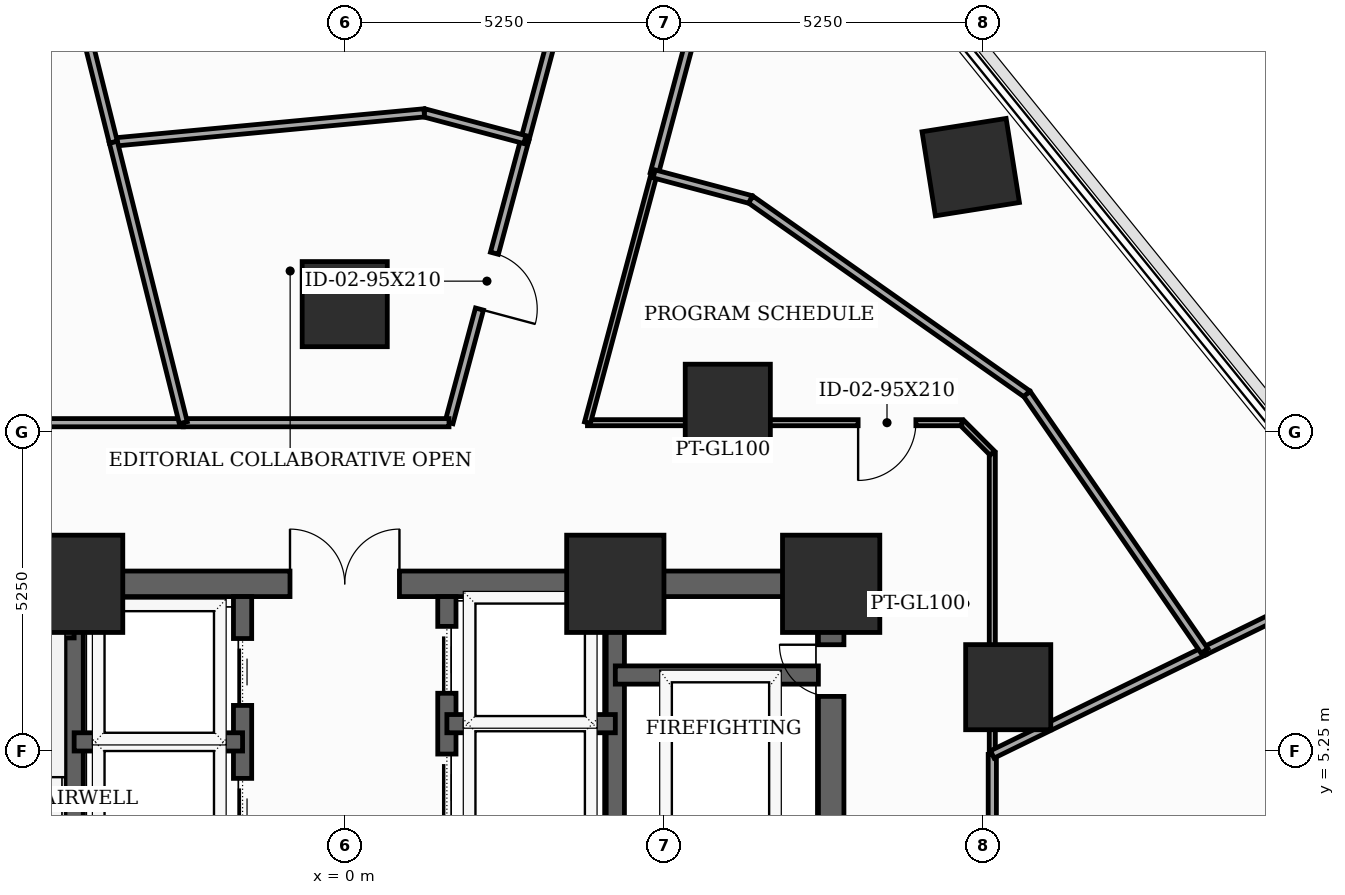
"""IFC4 building model, lengths in metres.
Left out: names, types, materials, properties, quantities, classifications, styles, units other than length and angle.
Written with IfcOpenShell. Run it as: python <this file> out.ifc"""

import sys

from ifc_helpers import new_model, si_unit, direction, frame, frame_2d, origin, origin_2d, place, context, subcontext, project, spatial, rectangle, extrude, element, fill, save


model = new_model("IFC4")
c1 = context("Model", 3, precision=1e-05, world=origin(), true_north=direction((0.0, 1.0)))
c2 = subcontext(c1, "Body", "Model", "MODEL_VIEW")
j1 = project(units=[si_unit("LENGTHUNIT", "METRE"), si_unit("PLANEANGLEUNIT", "RADIAN")], contexts=[c1])
p1 = place(None, origin())
s1 = spatial("IfcSite", under=j1, at=p1, CompositionType="ELEMENT")
p2 = place(p1, origin())
s2 = spatial("IfcBuilding", under=s1, at=p2, CompositionType="ELEMENT")
p3 = place(p2, frame((0.0, 0.0, 66.7)))
s3 = spatial("IfcBuildingStorey", under=s2, at=p3, CompositionType="ELEMENT", Elevation=66.7)
for number, where, z_axis, x_axis in (
    (1, (8.0, 8.0, 0.0), (0.0, 0.0, 1.0), (1.0, 0.0, 0.0)),
    (2, (4.45, 8.0, 0.0), (0.0, 0.0, 1.0), (1.0, 0.0, 0.0)),
    (3, (-4.45, 8.0, 0.0), (0.0, 0.0, 1.0), (1.0, 0.0, 0.0)),
):
    element("IfcColumn", number, at=place(p3, frame(where, z_axis=z_axis, x_axis=x_axis)), inside=s3, PredefinedType="COLUMN", context=c2, shape_type="SweptSolid", body=[
        extrude(rectangle(XDim=1.6, YDim=1.6, at=origin_2d()), origin(), (0.0, 0.0, 1.0), 3.7),
    ])
for number, where, z_axis, x_axis in (
    (4, (10.912, 6.3, 0.0), (0.0, 0.0, 1.0), (1.0, 0.0, 0.0)),
    (5, (6.3, 10.912, 0.0), (0.0, 0.0, 1.0), (1.0, 0.0, 0.0)),
    (6, (0.0, 12.6, 0.0), (0.0, 0.0, 1.0), (1.0, 0.0, 0.0)),
    (7, (10.295, 14.853, 0.0), (0.0, 0.0, 1.0), (0.988, 0.156, 0.0)),
):
    element("IfcColumn", number, at=place(p3, frame(where, z_axis=z_axis, x_axis=x_axis)), inside=s3, PredefinedType="COLUMN", context=c2, shape_type="SweptSolid", body=[
        extrude(rectangle(XDim=1.4, YDim=1.4, at=origin_2d()), origin(), (0.0, 0.0, 1.0), 3.7),
    ])
p4 = place(p3, frame((8.0, -8.0, 0.0), z_axis=(0.0, 0.0, 1.0), x_axis=(0.0, 1.0, 0.0)))
e8 = element("IfcWall", 8, at=p4, inside=s3, PredefinedType="SHEAR", context=c2, shape_type="SweptSolid", body=[
    extrude(rectangle(XDim=16.0, YDim=0.42, at=frame_2d((8.0, 0.0))), origin(), (0.0, 0.0, 1.0), 3.5),
])
p5 = place(p4, frame((9.6, 0.0, 0.0)))
e9 = element("IfcOpeningElement", 9, at=p5, cuts=e8, PredefinedType="OPENING", context=c2, shape_type="SweptSolid", body=[
    extrude(rectangle(XDim=1.05, YDim=2.15, at=frame_2d((0.525, 1.075))), frame((0.0, 0.22, 0.0), z_axis=(0.0, -1.0, 0.0), x_axis=(1.0, 0.0, 0.0)), (0.0, 0.0, 1.0), 0.44),
])
p6 = place(p4, frame((14.148, 0.0, 0.0)))
e10 = element("IfcOpeningElement", 10, at=p6, cuts=e8, PredefinedType="OPENING", context=c2, shape_type="SweptSolid", body=[
    extrude(rectangle(XDim=0.85, YDim=2.02, at=frame_2d((0.425, 1.01))), frame((0.0, 0.22, 0.0), z_axis=(0.0, -1.0, 0.0), x_axis=(1.0, 0.0, 0.0)), (0.0, 0.0, 1.0), 0.44),
])
p7 = place(p3, frame((-8.0, 8.0, 0.0), z_axis=(0.0, 0.0, 1.0), x_axis=(1.0, 0.0, 0.0)))
e11 = element("IfcWall", 11, at=p7, inside=s3, PredefinedType="SHEAR", context=c2, shape_type="SweptSolid", body=[
    extrude(rectangle(XDim=16.0, YDim=0.42, at=frame_2d((8.0, 0.0))), origin(), (0.0, 0.0, 1.0), 3.5),
])
p8 = place(p7, frame((7.1, 0.0, 0.0)))
e12 = element("IfcOpeningElement", 12, at=p8, cuts=e11, PredefinedType="OPENING", context=c2, shape_type="SweptSolid", body=[
    extrude(rectangle(XDim=1.8, YDim=2.15, at=frame_2d((0.9, 1.075))), frame((0.0, 0.22, 0.0), z_axis=(0.0, -1.0, 0.0), x_axis=(1.0, 0.0, 0.0)), (0.0, 0.0, 1.0), 0.44),
])
for number, where, z_axis, x_axis in (
    (13, (-4.45, -7.79, 0.0), (0.0, 0.0, 1.0), (0.0, 1.0, 0.0)),
    (14, (4.45, -7.79, 0.0), (0.0, 0.0, 1.0), (0.0, 1.0, 0.0)),
):
    element("IfcWall", number, at=place(p3, frame(where, z_axis=z_axis, x_axis=x_axis)), inside=s3, PredefinedType="SHEAR", context=c2, shape_type="SweptSolid", body=[
        extrude(rectangle(XDim=15.58, YDim=0.3, at=frame_2d((7.79, 0.0))), origin(), (0.0, 0.0, 1.0), 3.5),
    ])
for number, where, z_axis, x_axis in (
    (15, (-7.79, 7.26, 0.0), (0.0, 0.0, 1.0), (1.0, 0.0, 0.0)),
    (16, (4.45, 6.5, 0.0), (0.0, 0.0, 1.0), (1.0, 0.0, 0.0)),
):
    element("IfcWall", number, at=place(p3, frame(where, z_axis=z_axis, x_axis=x_axis)), inside=s3, PredefinedType="SHEAR", context=c2, shape_type="SweptSolid", body=[
        extrude(rectangle(XDim=3.34, YDim=0.3, at=frame_2d((1.67, 0.0))), origin(), (0.0, 0.0, 1.0), 3.5),
    ])
p9 = place(p3, frame((-1.68, -4.85, 0.0), z_axis=(0.0, 0.0, 1.0), x_axis=(0.0, 1.0, 0.0)))
e17 = element("IfcWall", 17, at=p9, inside=s3, PredefinedType="SHEAR", context=c2, shape_type="SweptSolid", body=[
    extrude(rectangle(XDim=12.64, YDim=0.3, at=frame_2d((6.32, 0.0))), origin(), (0.0, 0.0, 1.0), 3.5),
])
p10 = place(p9, frame((3.95, 0.0, 0.0)))
e18 = element("IfcOpeningElement", 18, at=p10, cuts=e17, PredefinedType="OPENING", context=c2, shape_type="SweptSolid", body=[
    extrude(rectangle(XDim=1.1, YDim=2.1, at=frame_2d((0.55, 1.05))), frame((0.0, 0.16, 0.0), z_axis=(0.0, -1.0, 0.0), x_axis=(1.0, 0.0, 0.0)), (0.0, 0.0, 1.0), 0.32),
])
p11 = place(p9, frame((6.25, 0.0, 0.0)))
e19 = element("IfcOpeningElement", 19, at=p11, cuts=e17, PredefinedType="OPENING", context=c2, shape_type="SweptSolid", body=[
    extrude(rectangle(XDim=1.1, YDim=2.1, at=frame_2d((0.55, 1.05))), frame((0.0, 0.16, 0.0), z_axis=(0.0, -1.0, 0.0), x_axis=(1.0, 0.0, 0.0)), (0.0, 0.0, 1.0), 0.32),
])
p12 = place(p9, frame((8.55, 0.0, 0.0)))
e20 = element("IfcOpeningElement", 20, at=p12, cuts=e17, PredefinedType="OPENING", context=c2, shape_type="SweptSolid", body=[
    extrude(rectangle(XDim=1.1, YDim=2.1, at=frame_2d((0.55, 1.05))), frame((0.0, 0.16, 0.0), z_axis=(0.0, -1.0, 0.0), x_axis=(1.0, 0.0, 0.0)), (0.0, 0.0, 1.0), 0.32),
])
p13 = place(p9, frame((10.85, 0.0, 0.0)))
e21 = element("IfcOpeningElement", 21, at=p13, cuts=e17, PredefinedType="OPENING", context=c2, shape_type="SweptSolid", body=[
    extrude(rectangle(XDim=1.1, YDim=2.1, at=frame_2d((0.55, 1.05))), frame((0.0, 0.16, 0.0), z_axis=(0.0, -1.0, 0.0), x_axis=(1.0, 0.0, 0.0)), (0.0, 0.0, 1.0), 0.32),
])
p14 = place(p9, frame((0.45, 0.0, 0.0)))
e22 = element("IfcOpeningElement", 22, at=p14, cuts=e17, PredefinedType="OPENING", context=c2, shape_type="SweptSolid", body=[
    extrude(rectangle(XDim=0.85, YDim=2.02, at=frame_2d((0.425, 1.01))), frame((0.0, 0.16, 0.0), z_axis=(0.0, -1.0, 0.0), x_axis=(1.0, 0.0, 0.0)), (0.0, 0.0, 1.0), 0.32),
])
p15 = place(p9, frame((2.05, 0.0, 0.0)))
e23 = element("IfcOpeningElement", 23, at=p15, cuts=e17, PredefinedType="OPENING", context=c2, shape_type="SweptSolid", body=[
    extrude(rectangle(XDim=0.85, YDim=2.02, at=frame_2d((0.425, 1.01))), frame((0.0, 0.16, 0.0), z_axis=(0.0, -1.0, 0.0), x_axis=(1.0, 0.0, 0.0)), (0.0, 0.0, 1.0), 0.32),
])
p16 = place(p3, frame((1.68, -4.85, 0.0), z_axis=(0.0, 0.0, 1.0), x_axis=(0.0, 1.0, 0.0)))
e24 = element("IfcWall", 24, at=p16, inside=s3, PredefinedType="SHEAR", context=c2, shape_type="SweptSolid", body=[
    extrude(rectangle(XDim=12.64, YDim=0.3, at=frame_2d((6.32, 0.0))), origin(), (0.0, 0.0, 1.0), 3.5),
])
p17 = place(p16, frame((0.55, 0.0, 0.0)))
e25 = element("IfcOpeningElement", 25, at=p17, cuts=e24, PredefinedType="OPENING", context=c2, shape_type="SweptSolid", body=[
    extrude(rectangle(XDim=1.1, YDim=2.1, at=frame_2d((0.55, 1.05))), frame((0.0, 0.16, 0.0), z_axis=(0.0, -1.0, 0.0), x_axis=(1.0, 0.0, 0.0)), (0.0, 0.0, 1.0), 0.32),
])
p18 = place(p16, frame((2.65, 0.0, 0.0)))
e26 = element("IfcOpeningElement", 26, at=p18, cuts=e24, PredefinedType="OPENING", context=c2, shape_type="SweptSolid", body=[
    extrude(rectangle(XDim=1.1, YDim=2.1, at=frame_2d((0.55, 1.05))), frame((0.0, 0.16, 0.0), z_axis=(0.0, -1.0, 0.0), x_axis=(1.0, 0.0, 0.0)), (0.0, 0.0, 1.0), 0.32),
])
p19 = place(p16, frame((4.75, 0.0, 0.0)))
e27 = element("IfcOpeningElement", 27, at=p19, cuts=e24, PredefinedType="OPENING", context=c2, shape_type="SweptSolid", body=[
    extrude(rectangle(XDim=1.1, YDim=2.1, at=frame_2d((0.55, 1.05))), frame((0.0, 0.16, 0.0), z_axis=(0.0, -1.0, 0.0), x_axis=(1.0, 0.0, 0.0)), (0.0, 0.0, 1.0), 0.32),
])
p20 = place(p16, frame((6.85, 0.0, 0.0)))
e28 = element("IfcOpeningElement", 28, at=p20, cuts=e24, PredefinedType="OPENING", context=c2, shape_type="SweptSolid", body=[
    extrude(rectangle(XDim=1.1, YDim=2.1, at=frame_2d((0.55, 1.05))), frame((0.0, 0.16, 0.0), z_axis=(0.0, -1.0, 0.0), x_axis=(1.0, 0.0, 0.0)), (0.0, 0.0, 1.0), 0.32),
])
p21 = place(p16, frame((8.95, 0.0, 0.0)))
e29 = element("IfcOpeningElement", 29, at=p21, cuts=e24, PredefinedType="OPENING", context=c2, shape_type="SweptSolid", body=[
    extrude(rectangle(XDim=1.1, YDim=2.1, at=frame_2d((0.55, 1.05))), frame((0.0, 0.16, 0.0), z_axis=(0.0, -1.0, 0.0), x_axis=(1.0, 0.0, 0.0)), (0.0, 0.0, 1.0), 0.32),
])
p22 = place(p16, frame((11.05, 0.0, 0.0)))
e30 = element("IfcOpeningElement", 30, at=p22, cuts=e24, PredefinedType="OPENING", context=c2, shape_type="SweptSolid", body=[
    extrude(rectangle(XDim=1.1, YDim=2.1, at=frame_2d((0.55, 1.05))), frame((0.0, 0.16, 0.0), z_axis=(0.0, -1.0, 0.0), x_axis=(1.0, 0.0, 0.0)), (0.0, 0.0, 1.0), 0.32),
])
for number, where, z_axis, x_axis in (
    (31, (-4.45, 5.4, 0.0), (0.0, 0.0, 1.0), (1.0, 0.0, 0.0)),
    (32, (1.68, 5.7, 0.0), (0.0, 0.0, 1.0), (1.0, 0.0, 0.0)),
):
    element("IfcWall", number, at=place(p3, frame(where, z_axis=z_axis, x_axis=x_axis)), inside=s3, PredefinedType="SHEAR", context=c2, shape_type="SweptSolid", body=[
        extrude(rectangle(XDim=2.77, YDim=0.3, at=frame_2d((1.385, 0.0))), origin(), (0.0, 0.0, 1.0), 3.5),
    ])
p23 = place(p3, frame((10.65, -1.715, 0.0), z_axis=(0.0, 0.0, 1.0), x_axis=(0.0, 1.0, 0.0)))
e33 = element("IfcWall", 33, at=p23, inside=s3, PredefinedType="PARTITIONING", context=c2, shape_type="SweptSolid", body=[
    extrude(rectangle(XDim=6.909, YDim=0.135, at=frame_2d((3.455, 0.0))), origin(), (0.0, 0.0, 1.0), 2.785),
])
p24 = place(p3, frame((2.963, 15.306, 0.0), z_axis=(0.0, 0.0, 1.0), x_axis=(-0.25886350996, -0.965913910869, 0.0)))
e34 = element("IfcWall", 34, at=p24, inside=s3, PredefinedType="PARTITIONING", context=c2, shape_type="SweptSolid", body=[
    extrude(rectangle(XDim=4.82, YDim=0.135, at=frame_2d((2.41, 0.0))), origin(), (0.0, 0.0, 1.0), 2.785),
])
p25 = place(p24, frame((1.935, 0.0, 0.0)))
e35 = element("IfcOpeningElement", 35, at=p25, cuts=e34, PredefinedType="OPENING", context=c2, shape_type="SweptSolid", body=[
    extrude(rectangle(XDim=0.95, YDim=2.1, at=frame_2d((0.475, 1.05))), frame((0.0, 0.077, 0.0), z_axis=(0.0, -1.0, 0.0), x_axis=(1.0, 0.0, 0.0)), (0.0, 0.0, 1.0), 0.155),
])
p26 = place(p3, frame((1.715, 10.65, 0.0), z_axis=(0.0, 0.0, 1.0), x_axis=(-1.0, 0.0, 0.0)))
e36 = element("IfcWall", 36, at=p26, inside=s3, PredefinedType="PARTITIONING", context=c2, shape_type="SweptSolid", body=[
    extrude(rectangle(XDim=4.37, YDim=0.135, at=frame_2d((2.185, 0.0))), origin(), (0.0, 0.0, 1.0), 2.785),
])
p27 = place(p3, frame((5.089, 14.742, 0.0), z_axis=(0.0, 0.0, 1.0), x_axis=(0.258768350918, 0.965939408329, 0.0)))
e37 = element("IfcWall", 37, at=p27, inside=s3, PredefinedType="PARTITIONING", context=c2, shape_type="SweptSolid", body=[
    extrude(rectangle(XDim=5.043, YDim=0.135, at=frame_2d((2.521, 0.0))), origin(), (0.0, 0.0, 1.0), 2.935),
])
p28 = place(p3, frame((4.269, 20.183, 0.0), z_axis=(0.0, 0.0, 1.0), x_axis=(-0.258691774004, -0.965959919491, 0.0)))
e38 = element("IfcWall", 38, at=p28, inside=s3, PredefinedType="PARTITIONING", context=c2, shape_type="SweptSolid", body=[
    extrude(rectangle(XDim=5.049, YDim=0.135, at=frame_2d((2.524, 0.0))), origin(), (0.0, 0.0, 1.0), 3.085),
])
p29 = place(p28, frame((2.049, 0.0, 0.0)))
e39 = element("IfcOpeningElement", 39, at=p29, cuts=e38, PredefinedType="OPENING", context=c2, shape_type="SweptSolid", body=[
    extrude(rectangle(XDim=0.95, YDim=2.1, at=frame_2d((0.475, 1.05))), frame((0.0, 0.077, 0.0), z_axis=(0.0, -1.0, 0.0), x_axis=(1.0, 0.0, 0.0)), (0.0, 0.0, 1.0), 0.155),
])
p30 = place(p3, frame((10.65, 5.194, 0.0), z_axis=(0.0, 0.0, 1.0), x_axis=(0.0, 1.0, 0.0)))
e40 = element("IfcWall", 40, at=p30, inside=s3, PredefinedType="MOVABLE", context=c2, shape_type="SweptSolid", body=[
    extrude(rectangle(XDim=4.956, YDim=0.1, at=frame_2d((2.478, 0.0))), origin(), (0.0, 0.0, 1.0), 2.785),
])
p31 = place(p3, frame((10.65, 10.15, 0.0), z_axis=(0.0, 0.0, 1.0), x_axis=(-0.707106781187, 0.707106781187, 0.0)))
e41 = element("IfcWall", 41, at=p31, inside=s3, PredefinedType="MOVABLE", context=c2, shape_type="SweptSolid", body=[
    extrude(rectangle(XDim=0.707, YDim=0.1, at=frame_2d((0.354, 0.0))), origin(), (0.0, 0.0, 1.0), 3.5),
])
p32 = place(p3, frame((10.15, 10.65, 0.0), z_axis=(0.0, 0.0, 1.0), x_axis=(-1.0, 0.0, 0.0)))
e42 = element("IfcWall", 42, at=p32, inside=s3, PredefinedType="MOVABLE", context=c2, shape_type="SweptSolid", body=[
    extrude(rectangle(XDim=6.158, YDim=0.1, at=frame_2d((3.079, 0.0))), origin(), (0.0, 0.0, 1.0), 2.785),
])
p33 = place(p32, frame((0.757, 0.0, 0.0)))
e43 = element("IfcOpeningElement", 43, at=p33, cuts=e42, PredefinedType="OPENING", context=c2, shape_type="SweptSolid", body=[
    extrude(rectangle(XDim=0.95, YDim=2.1, at=frame_2d((0.475, 1.05))), frame((0.0, 0.06, 0.0), z_axis=(0.0, -1.0, 0.0), x_axis=(1.0, 0.0, 0.0)), (0.0, 0.0, 1.0), 0.12),
])
p34 = place(p3, frame((3.992, 10.65, 0.0), z_axis=(0.0, 0.0, 1.0), x_axis=(0.258975157658, 0.965883982534, 0.0)))
e44 = element("IfcWall", 44, at=p34, inside=s3, PredefinedType="MOVABLE", context=c2, shape_type="SweptSolid", body=[
    extrude(rectangle(XDim=4.237, YDim=0.1, at=frame_2d((2.118, 0.0))), origin(), (0.0, 0.0, 1.0), 2.785),
])
p35 = place(p3, frame((-2.655, 10.65, 0.0), z_axis=(0.0, 0.0, 1.0), x_axis=(-1.0, 0.0, 0.0)))
e45 = element("IfcWall", 45, at=p35, inside=s3, PredefinedType="PARTITIONING", context=c2, shape_type="SweptSolid", body=[
    extrude(rectangle(XDim=7.495, YDim=0.135, at=frame_2d((3.748, 0.0))), origin(), (0.0, 0.0, 1.0), 2.785),
])
p36 = place(p3, frame((17.082, 8.332, 0.0), z_axis=(0.0, 0.0, 1.0), x_axis=(-0.898652301999, -0.438661646503, 0.0)))
e46 = element("IfcWall", 46, at=p36, inside=s3, PredefinedType="PARTITIONING", context=c2, shape_type="SweptSolid", body=[
    extrude(rectangle(XDim=3.274, YDim=0.135, at=frame_2d((1.637, 0.0))), origin(), (0.0, 0.0, 1.0), 2.785),
])
p37 = place(p3, frame((14.14, 6.896, 0.0), z_axis=(0.0, 0.0, 1.0), x_axis=(-0.898822220958, -0.438313375467, 0.0)))
e47 = element("IfcWall", 47, at=p37, inside=s3, PredefinedType="PARTITIONING", context=c2, shape_type="SweptSolid", body=[
    extrude(rectangle(XDim=3.883, YDim=0.135, at=frame_2d((1.941, 0.0))), origin(), (0.0, 0.0, 1.0), 2.785),
])
p38 = place(p3, frame((2.963, 15.306, 0.0), z_axis=(0.0, 0.0, 1.0), x_axis=(-0.966393308076, 0.257068034001, 0.0)))
e48 = element("IfcWall", 48, at=p38, inside=s3, PredefinedType="PARTITIONING", context=c2, shape_type="SweptSolid", body=[
    extrude(rectangle(XDim=1.712, YDim=0.135, at=frame_2d((0.856, 0.0))), origin(), (0.0, 0.0, 1.0), 2.785),
])
p39 = place(p3, frame((1.308, 15.746, 0.0), z_axis=(0.0, 0.0, 1.0), x_axis=(-0.995602282193, -0.09368081817, 0.0)))
e49 = element("IfcWall", 49, at=p39, inside=s3, PredefinedType="PARTITIONING", context=c2, shape_type="SweptSolid", body=[
    extrude(rectangle(XDim=5.137, YDim=0.135, at=frame_2d((2.568, 0.0))), origin(), (0.0, 0.0, 1.0), 2.785),
])
p40 = place(p3, frame((-3.806, 15.265, 0.0), z_axis=(0.0, 0.0, 1.0), x_axis=(0.241967938053, -0.970284245443, 0.0)))
e50 = element("IfcWall", 50, at=p40, inside=s3, PredefinedType="PARTITIONING", context=c2, shape_type="SweptSolid", body=[
    extrude(rectangle(XDim=4.756, YDim=0.135, at=frame_2d((2.378, 0.0))), origin(), (0.0, 0.0, 1.0), 2.785),
])
p41 = place(p3, frame((5.089, 14.742, 0.0), z_axis=(0.0, 0.0, 1.0), x_axis=(0.966471299447, -0.256774662584, 0.0)))
e51 = element("IfcWall", 51, at=p41, inside=s3, PredefinedType="PARTITIONING", context=c2, shape_type="SweptSolid", body=[
    extrude(rectangle(XDim=1.643, YDim=0.135, at=frame_2d((0.822, 0.0))), origin(), (0.0, 0.0, 1.0), 3.085),
])
p42 = place(p3, frame((6.677, 14.32, 0.0), z_axis=(0.0, 0.0, 1.0), x_axis=(0.817854672362, -0.575424829926, 0.0)))
e52 = element("IfcWall", 52, at=p42, inside=s3, PredefinedType="PARTITIONING", context=c2, shape_type="SweptSolid", body=[
    extrude(rectangle(XDim=5.556, YDim=0.135, at=frame_2d((2.778, 0.0))), origin(), (0.0, 0.0, 1.0), 2.785),
])
p43 = place(p3, frame((11.221, 11.123, 0.0), z_axis=(0.0, 0.0, 1.0), x_axis=(0.568225964568, -0.822872561938, 0.0)))
e53 = element("IfcWall", 53, at=p43, inside=s3, PredefinedType="PARTITIONING", context=c2, shape_type="SweptSolid", body=[
    extrude(rectangle(XDim=5.137, YDim=0.135, at=frame_2d((2.568, 0.0))), origin(), (0.0, 0.0, 1.0), 2.785),
])
p44 = place(p3, frame((-7.718, 30.954, 0.0), z_axis=(0.0, 0.0, 1.0), x_axis=(0.241928072824, -0.9702941861, 0.0)))
e54 = element("IfcWall", 54, at=p44, inside=s3, PredefinedType="PARTITIONING", context=c2, shape_type="SweptSolid", body=[
    extrude(rectangle(XDim=16.169, YDim=0.135, at=frame_2d((8.085, 0.0))), origin(), (0.0, 0.0, 1.0), 2.935),
])
p45 = place(p6, origin())
e55 = element("IfcDoor", 55, at=p45, inside=s3, OperationType="SINGLE_SWING_RIGHT", PredefinedType="TRAPDOOR", context=c2, shape_type="SweptSolid", body=[
    extrude(rectangle(XDim=0.85, YDim=2.02, at=frame_2d((0.425, 1.01))), frame((0.0, 0.025, 0.0), z_axis=(0.0, -1.0, 0.0), x_axis=(1.0, 0.0, 0.0)), (0.0, 0.0, 1.0), 0.05),
])
fill(e10, e55)
p46 = place(p8, origin())
e56 = element("IfcDoor", 56, at=p46, inside=s3, OperationType="DOUBLE_DOOR_SINGLE_SWING", PredefinedType="DOOR", context=c2, shape_type="SweptSolid", body=[
    extrude(rectangle(XDim=1.8, YDim=2.15, at=frame_2d((0.9, 1.075))), frame((0.0, 0.025, 0.0), z_axis=(0.0, -1.0, 0.0), x_axis=(1.0, 0.0, 0.0)), (0.0, 0.0, 1.0), 0.05),
])
fill(e12, e56)
p47 = place(p12, origin())
e57 = element("IfcDoor", 57, at=p47, inside=s3, OperationType="SLIDING_TO_LEFT", PredefinedType="DOOR", context=c2, shape_type="SweptSolid", body=[
    extrude(rectangle(XDim=1.1, YDim=2.1, at=frame_2d((0.55, 1.05))), frame((0.0, 0.025, 0.0), z_axis=(0.0, -1.0, 0.0), x_axis=(1.0, 0.0, 0.0)), (0.0, 0.0, 1.0), 0.05),
])
fill(e20, e57)
p48 = place(p13, origin())
e58 = element("IfcDoor", 58, at=p48, inside=s3, OperationType="SLIDING_TO_LEFT", PredefinedType="DOOR", context=c2, shape_type="SweptSolid", body=[
    extrude(rectangle(XDim=1.1, YDim=2.1, at=frame_2d((0.55, 1.05))), frame((0.0, 0.025, 0.0), z_axis=(0.0, -1.0, 0.0), x_axis=(1.0, 0.0, 0.0)), (0.0, 0.0, 1.0), 0.05),
])
fill(e21, e58)
p49 = place(p21, origin())
e59 = element("IfcDoor", 59, at=p49, inside=s3, OperationType="SLIDING_TO_LEFT", PredefinedType="DOOR", context=c2, shape_type="SweptSolid", body=[
    extrude(rectangle(XDim=1.1, YDim=2.1, at=frame_2d((0.55, 1.05))), frame((0.0, 0.025, 0.0), z_axis=(0.0, -1.0, 0.0), x_axis=(1.0, 0.0, 0.0)), (0.0, 0.0, 1.0), 0.05),
])
fill(e29, e59)
p50 = place(p22, origin())
e60 = element("IfcDoor", 60, at=p50, inside=s3, OperationType="SLIDING_TO_LEFT", PredefinedType="DOOR", context=c2, shape_type="SweptSolid", body=[
    extrude(rectangle(XDim=1.1, YDim=2.1, at=frame_2d((0.55, 1.05))), frame((0.0, 0.025, 0.0), z_axis=(0.0, -1.0, 0.0), x_axis=(1.0, 0.0, 0.0)), (0.0, 0.0, 1.0), 0.05),
])
fill(e30, e60)
p51 = place(p25, origin())
e61 = element("IfcDoor", 61, at=p51, inside=s3, OperationType="SINGLE_SWING_RIGHT", PredefinedType="DOOR", context=c2, shape_type="SweptSolid", body=[
    extrude(rectangle(XDim=0.95, YDim=2.1, at=frame_2d((0.475, 1.05))), frame((0.0, 0.025, 0.0), z_axis=(0.0, -1.0, 0.0), x_axis=(1.0, 0.0, 0.0)), (0.0, 0.0, 1.0), 0.05),
])
fill(e35, e61)
p52 = place(p33, origin())
e62 = element("IfcDoor", 62, at=p52, inside=s3, OperationType="SINGLE_SWING_RIGHT", PredefinedType="DOOR", context=c2, shape_type="SweptSolid", body=[
    extrude(rectangle(XDim=0.95, YDim=2.1, at=frame_2d((0.475, 1.05))), frame((0.0, 0.025, 0.0), z_axis=(0.0, -1.0, 0.0), x_axis=(1.0, 0.0, 0.0)), (0.0, 0.0, 1.0), 0.05),
])
fill(e43, e62)
save(model, sys.argv[1])
